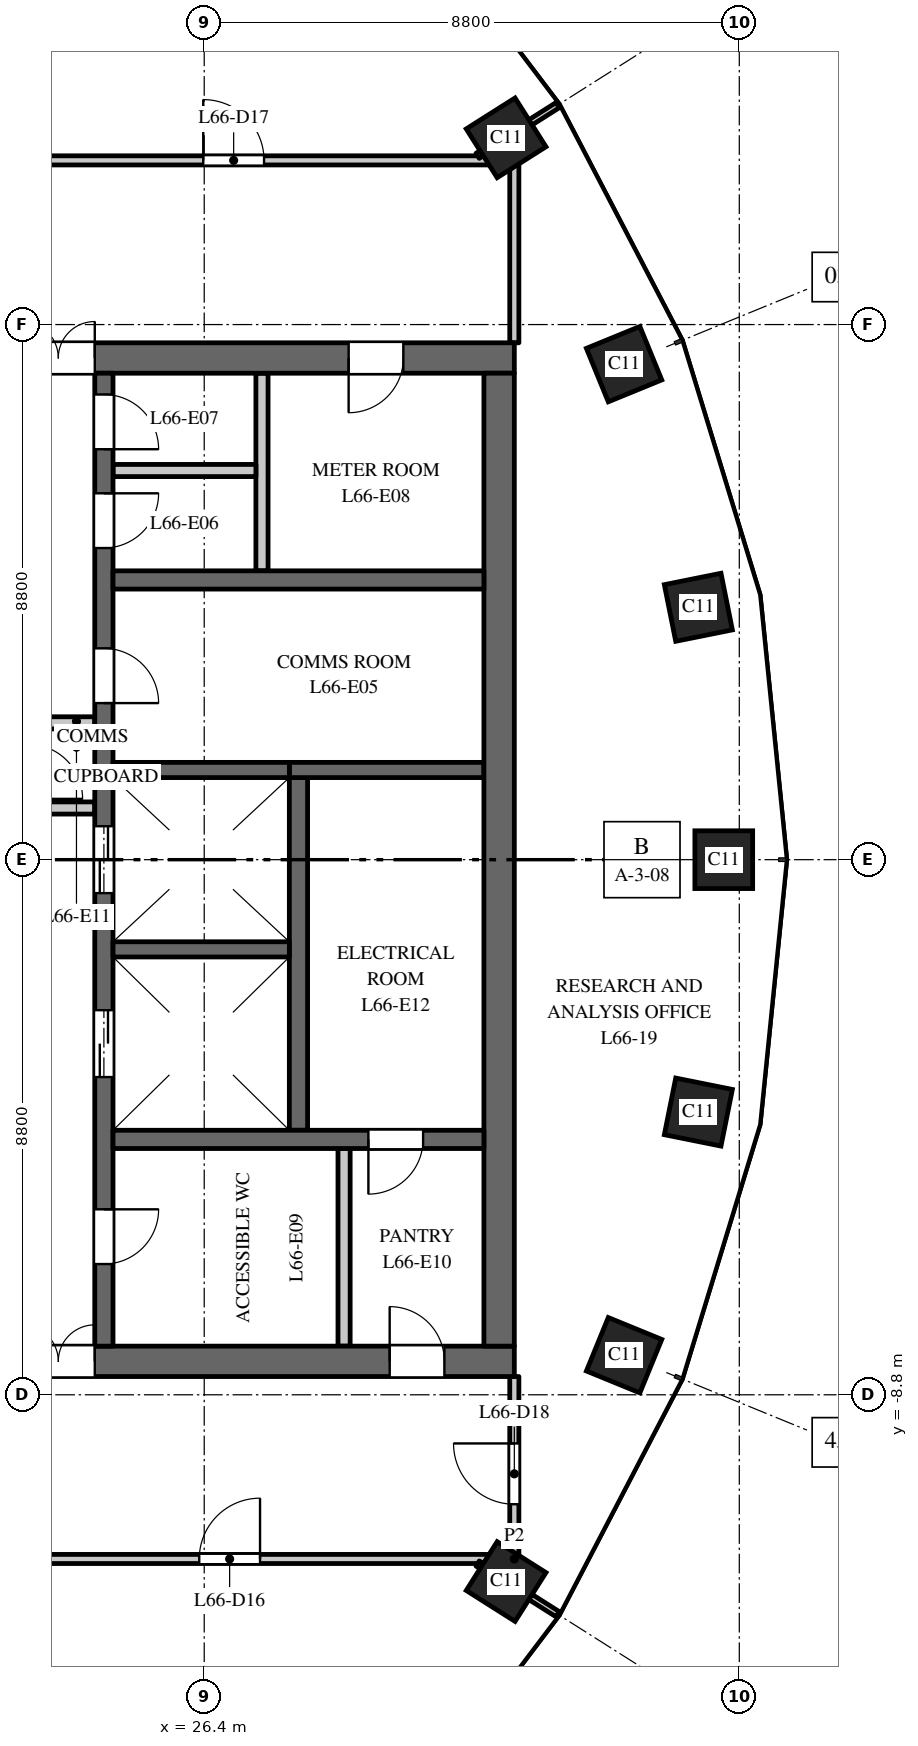
"""IFC4 building model, lengths in metres.
Left out: names, types, materials, properties, quantities, classifications, styles, units other than length and angle.
Written with IfcOpenShell. Run it as: python <this file> out.ifc"""

import sys

from ifc_helpers import new_model, si_unit, direction, frame, frame_2d, origin, origin_2d, place, context, subcontext, project, spatial, rectangle, extrude, element, fill, save


model = new_model("IFC4")
c1 = context("Model", 3, precision=1e-05, world=origin(), true_north=direction((0.0, 1.0)))
c2 = subcontext(c1, "Body", "Model", "MODEL_VIEW")
j1 = project(units=[si_unit("LENGTHUNIT", "METRE"), si_unit("PLANEANGLEUNIT", "RADIAN")], contexts=[c1])
p1 = place(None, origin())
s1 = spatial("IfcSite", under=j1, at=p1, CompositionType="ELEMENT")
p2 = place(p1, origin())
s2 = spatial("IfcBuilding", under=s1, at=p2, CompositionType="ELEMENT")
p3 = place(p2, frame((0.0, 0.0, 307.0)))
s3 = spatial("IfcBuildingStorey", under=s2, at=p3, CompositionType="ELEMENT", Elevation=307.0)
for number, where, z_axis, x_axis in (
    (1, (34.945, 0.0, 0.0), (0.0, 0.0, 1.0), (0.0, 1.0, 0.0)),
    (2, (34.527, 4.151, 0.0), (0.0, 0.0, 1.0), (-0.197, 0.98, 0.0)),
    (3, (33.305, 8.149, 0.0), (0.0, 0.0, 1.0), (-0.379, 0.925, 0.0)),
    (4, (31.365, 11.871, 0.0), (0.0, 0.0, 1.0), (-0.535, 0.845, 0.0)),
    (5, (31.365, -11.871, 0.0), (0.0, 0.0, 1.0), (0.535, 0.845, 0.0)),
    (6, (33.305, -8.149, 0.0), (0.0, 0.0, 1.0), (0.379, 0.925, 0.0)),
    (7, (34.527, -4.151, 0.0), (0.0, 0.0, 1.0), (0.197, 0.98, 0.0)),
):
    element("IfcColumn", number, at=place(p3, frame(where, z_axis=z_axis, x_axis=x_axis)), inside=s3, PredefinedType="COLUMN", context=c2, shape_type="SweptSolid", body=[
        extrude(rectangle(XDim=0.95, YDim=0.95, at=origin_2d()), origin(), (0.0, 0.0, 1.0), 4.0),
    ])
p4 = place(p3, frame((16.5, 8.25, 0.0), z_axis=(0.0, 0.0, 1.0), x_axis=(1.0, 0.0, 0.0)))
e8 = element("IfcWall", 8, at=p4, inside=s3, PredefinedType="SHEAR", context=c2, shape_type="SweptSolid", body=[
    extrude(rectangle(XDim=15.0, YDim=0.5, at=frame_2d((7.5, 0.0))), origin(), (0.0, 0.0, 1.0), 3.7),
])
p5 = place(p4, frame((6.9, 0.0, 0.0)))
e9 = element("IfcOpeningElement", 9, at=p5, cuts=e8, PredefinedType="OPENING", context=c2, shape_type="SweptSolid", body=[
    extrude(rectangle(XDim=1.2, YDim=2.1, at=frame_2d((0.6, 1.05))), frame((0.0, 0.26, 0.0), z_axis=(0.0, -1.0, 0.0), x_axis=(1.0, 0.0, 0.0)), (0.0, 0.0, 1.0), 0.52),
])
p6 = place(p4, frame((12.275, 0.0, 0.0)))
e10 = element("IfcOpeningElement", 10, at=p6, cuts=e8, PredefinedType="OPENING", context=c2, shape_type="SweptSolid", body=[
    extrude(rectangle(XDim=0.9, YDim=2.1, at=frame_2d((0.45, 1.05))), frame((0.0, 0.26, 0.0), z_axis=(0.0, -1.0, 0.0), x_axis=(1.0, 0.0, 0.0)), (0.0, 0.0, 1.0), 0.52),
])
p7 = place(p3, frame((16.5, -8.25, 0.0), z_axis=(0.0, 0.0, 1.0), x_axis=(1.0, 0.0, 0.0)))
e11 = element("IfcWall", 11, at=p7, inside=s3, PredefinedType="SHEAR", context=c2, shape_type="SweptSolid", body=[
    extrude(rectangle(XDim=15.0, YDim=0.5, at=frame_2d((7.5, 0.0))), origin(), (0.0, 0.0, 1.0), 3.7),
])
p8 = place(p7, frame((6.9, 0.0, 0.0)))
e12 = element("IfcOpeningElement", 12, at=p8, cuts=e11, PredefinedType="OPENING", context=c2, shape_type="SweptSolid", body=[
    extrude(rectangle(XDim=1.2, YDim=2.1, at=frame_2d((0.6, 1.05))), frame((0.0, 0.26, 0.0), z_axis=(0.0, -1.0, 0.0), x_axis=(1.0, 0.0, 0.0)), (0.0, 0.0, 1.0), 0.52),
])
p9 = place(p7, frame((12.95, 0.0, 0.0)))
e13 = element("IfcOpeningElement", 13, at=p9, cuts=e11, PredefinedType="OPENING", context=c2, shape_type="SweptSolid", body=[
    extrude(rectangle(XDim=0.9, YDim=2.1, at=frame_2d((0.45, 1.05))), frame((0.0, 0.26, 0.0), z_axis=(0.0, -1.0, 0.0), x_axis=(1.0, 0.0, 0.0)), (0.0, 0.0, 1.0), 0.52),
])
p10 = place(p3, frame((27.95, -4.45, 0.0), z_axis=(0.0, 0.0, 1.0), x_axis=(0.0, 1.0, 0.0)))
e14 = element("IfcWall", 14, at=p10, inside=s3, PredefinedType="SHEAR", context=c2, shape_type="SweptSolid", body=[
    extrude(rectangle(XDim=5.8, YDim=0.3, at=frame_2d((2.9, 0.0))), origin(), (0.0, 0.0, 1.0), 3.7),
])
p11 = place(p3, frame((27.8, 1.475, 0.0), z_axis=(0.0, 0.0, 1.0), x_axis=(1.0, 0.0, 0.0)))
e15 = element("IfcWall", 15, at=p11, inside=s3, PredefinedType="SHEAR", context=c2, shape_type="SweptSolid", body=[
    extrude(rectangle(XDim=3.2, YDim=0.25, at=frame_2d((1.6, 0.0))), origin(), (0.0, 0.0, 1.0), 3.7),
])
p12 = place(p3, frame((24.75, -8.0, 0.0), z_axis=(0.0, 0.0, 1.0), x_axis=(0.0, 1.0, 0.0)))
e16 = element("IfcWall", 16, at=p12, inside=s3, PredefinedType="SHEAR", context=c2, shape_type="SweptSolid", body=[
    extrude(rectangle(XDim=16.0, YDim=0.3, at=frame_2d((8.0, 0.0))), origin(), (0.0, 0.0, 1.0), 3.7),
])
p13 = place(p12, frame((4.425, 0.0, 0.0)))
e17 = element("IfcOpeningElement", 17, at=p13, cuts=e16, PredefinedType="OPENING", context=c2, shape_type="SweptSolid", body=[
    extrude(rectangle(XDim=1.1, YDim=2.1, at=frame_2d((0.55, 1.05))), frame((0.0, 0.16, 0.0), z_axis=(0.0, -1.0, 0.0), x_axis=(1.0, 0.0, 0.0)), (0.0, 0.0, 1.0), 0.32),
])
p14 = place(p12, frame((7.45, 0.0, 0.0)))
e18 = element("IfcOpeningElement", 18, at=p14, cuts=e16, PredefinedType="OPENING", context=c2, shape_type="SweptSolid", body=[
    extrude(rectangle(XDim=1.1, YDim=2.1, at=frame_2d((0.55, 1.05))), frame((0.0, 0.16, 0.0), z_axis=(0.0, -1.0, 0.0), x_axis=(1.0, 0.0, 0.0)), (0.0, 0.0, 1.0), 0.32),
])
p15 = place(p12, frame((10.575, 0.0, 0.0)))
e19 = element("IfcOpeningElement", 19, at=p15, cuts=e16, PredefinedType="OPENING", context=c2, shape_type="SweptSolid", body=[
    extrude(rectangle(XDim=0.9, YDim=2.1, at=frame_2d((0.45, 1.05))), frame((0.0, 0.16, 0.0), z_axis=(0.0, -1.0, 0.0), x_axis=(1.0, 0.0, 0.0)), (0.0, 0.0, 1.0), 0.32),
])
p16 = place(p12, frame((13.125, 0.0, 0.0)))
e20 = element("IfcOpeningElement", 20, at=p16, cuts=e16, PredefinedType="OPENING", context=c2, shape_type="SweptSolid", body=[
    extrude(rectangle(XDim=0.9, YDim=2.1, at=frame_2d((0.45, 1.05))), frame((0.0, 0.16, 0.0), z_axis=(0.0, -1.0, 0.0), x_axis=(1.0, 0.0, 0.0)), (0.0, 0.0, 1.0), 0.32),
])
p17 = place(p12, frame((14.75, 0.0, 0.0)))
e21 = element("IfcOpeningElement", 21, at=p17, cuts=e16, PredefinedType="OPENING", context=c2, shape_type="SweptSolid", body=[
    extrude(rectangle(XDim=0.9, YDim=2.1, at=frame_2d((0.45, 1.05))), frame((0.0, 0.16, 0.0), z_axis=(0.0, -1.0, 0.0), x_axis=(1.0, 0.0, 0.0)), (0.0, 0.0, 1.0), 0.32),
])
p18 = place(p12, frame((1.35, 0.0, 0.0)))
e22 = element("IfcOpeningElement", 22, at=p18, cuts=e16, PredefinedType="OPENING", context=c2, shape_type="SweptSolid", body=[
    extrude(rectangle(XDim=0.9, YDim=2.1, at=frame_2d((0.45, 1.05))), frame((0.0, 0.16, 0.0), z_axis=(0.0, -1.0, 0.0), x_axis=(1.0, 0.0, 0.0)), (0.0, 0.0, 1.0), 0.32),
])
for number, where, z_axis, x_axis in (
    (23, (23.4, 0.85, 0.0), (0.0, 0.0, 1.0), (1.0, 0.0, 0.0)),
    (24, (23.4, 2.25, 0.0), (0.0, 0.0, 1.0), (1.0, 0.0, 0.0)),
):
    element("IfcWall", number, at=place(p3, frame(where, z_axis=z_axis, x_axis=x_axis)), inside=s3, PredefinedType="PARTITIONING", context=c2, shape_type="SweptSolid", body=[
        extrude(rectangle(XDim=1.2, YDim=0.2, at=frame_2d((0.6, 0.0))), origin(), (0.0, 0.0, 1.0), 3.7),
    ])
p19 = place(p3, frame((31.25, -8.0, 0.0), z_axis=(0.0, 0.0, 1.0), x_axis=(0.0, 1.0, 0.0)))
e25 = element("IfcWall", 25, at=p19, inside=s3, PredefinedType="SHEAR", context=c2, shape_type="SweptSolid", body=[
    extrude(rectangle(XDim=16.0, YDim=0.5, at=frame_2d((8.0, 0.0))), origin(), (0.0, 0.0, 1.0), 3.7),
])
p20 = place(p3, frame((24.9, 4.6, 0.0), z_axis=(0.0, 0.0, 1.0), x_axis=(1.0, 0.0, 0.0)))
e26 = element("IfcWall", 26, at=p20, inside=s3, PredefinedType="SHEAR", context=c2, shape_type="SweptSolid", body=[
    extrude(rectangle(XDim=6.1, YDim=0.3, at=frame_2d((3.05, 0.0))), origin(), (0.0, 0.0, 1.0), 3.7),
])
for number, where, z_axis, x_axis in (
    (27, (27.35, 4.75, 0.0), (0.0, 0.0, 1.0), (0.0, 1.0, 0.0)),
    (28, (28.7, -8.0, 0.0), (0.0, 0.0, 1.0), (0.0, 1.0, 0.0)),
):
    element("IfcWall", number, at=place(p3, frame(where, z_axis=z_axis, x_axis=x_axis)), inside=s3, PredefinedType="PARTITIONING", context=c2, shape_type="SweptSolid", body=[
        extrude(rectangle(XDim=3.25, YDim=0.2, at=frame_2d((1.625, 0.0))), origin(), (0.0, 0.0, 1.0), 3.7),
    ])
p21 = place(p3, frame((24.9, 6.4, 0.0), z_axis=(0.0, 0.0, 1.0), x_axis=(1.0, 0.0, 0.0)))
e29 = element("IfcWall", 29, at=p21, inside=s3, PredefinedType="PARTITIONING", context=c2, shape_type="SweptSolid", body=[
    extrude(rectangle(XDim=2.35, YDim=0.2, at=frame_2d((1.175, 0.0))), origin(), (0.0, 0.0, 1.0), 3.7),
])
p22 = place(p3, frame((24.9, -4.6, 0.0), z_axis=(0.0, 0.0, 1.0), x_axis=(1.0, 0.0, 0.0)))
e30 = element("IfcWall", 30, at=p22, inside=s3, PredefinedType="SHEAR", context=c2, shape_type="SweptSolid", body=[
    extrude(rectangle(XDim=6.1, YDim=0.3, at=frame_2d((3.05, 0.0))), origin(), (0.0, 0.0, 1.0), 3.7),
])
p23 = place(p22, frame((4.2, 0.0, 0.0)))
e31 = element("IfcOpeningElement", 31, at=p23, cuts=e30, PredefinedType="OPENING", context=c2, shape_type="SweptSolid", body=[
    extrude(rectangle(XDim=0.9, YDim=2.1, at=frame_2d((0.45, 1.05))), frame((0.0, 0.16, 0.0), z_axis=(0.0, -1.0, 0.0), x_axis=(1.0, 0.0, 0.0)), (0.0, 0.0, 1.0), 0.32),
])
for number, where, z_axis, x_axis in (
    (32, (24.9, -1.475, 0.0), (0.0, 0.0, 1.0), (1.0, 0.0, 0.0)),
    (33, (24.9, 1.475, 0.0), (0.0, 0.0, 1.0), (1.0, 0.0, 0.0)),
):
    element("IfcWall", number, at=place(p3, frame(where, z_axis=z_axis, x_axis=x_axis)), inside=s3, PredefinedType="SHEAR", context=c2, shape_type="SweptSolid", body=[
        extrude(rectangle(XDim=2.9, YDim=0.25, at=frame_2d((1.45, 0.0))), origin(), (0.0, 0.0, 1.0), 3.7),
    ])
p24 = place(p3, frame((0.315, -11.5, 0.0), z_axis=(0.0, 0.0, 1.0), x_axis=(1.0, 0.0, 0.0)))
e34 = element("IfcWall", 34, at=p24, inside=s3, PredefinedType="PARTITIONING", context=c2, shape_type="SweptSolid", body=[
    extrude(rectangle(XDim=31.185, YDim=0.15, at=frame_2d((15.593, 0.0))), origin(), (0.0, 0.0, 1.0), 2.75),
])
p25 = place(p24, frame((10.9, 0.0, 0.0)))
e35 = element("IfcOpeningElement", 35, at=p25, cuts=e34, PredefinedType="OPENING", context=c2, shape_type="SweptSolid", body=[
    extrude(rectangle(XDim=1.0, YDim=2.1, at=frame_2d((0.5, 1.05))), frame((0.0, 0.085, 0.0), z_axis=(0.0, -1.0, 0.0), x_axis=(1.0, 0.0, 0.0)), (0.0, 0.0, 1.0), 0.17),
])
p26 = place(p24, frame((26.003, 0.0, 0.0)))
e36 = element("IfcOpeningElement", 36, at=p26, cuts=e34, PredefinedType="OPENING", context=c2, shape_type="SweptSolid", body=[
    extrude(rectangle(XDim=1.0, YDim=2.1, at=frame_2d((0.5, 1.05))), frame((0.0, 0.085, 0.0), z_axis=(0.0, -1.0, 0.0), x_axis=(1.0, 0.0, 0.0)), (0.0, 0.0, 1.0), 0.17),
])
p27 = place(p3, frame((0.315, 11.5, 0.0), z_axis=(0.0, 0.0, 1.0), x_axis=(1.0, 0.0, 0.0)))
e37 = element("IfcWall", 37, at=p27, inside=s3, PredefinedType="PARTITIONING", context=c2, shape_type="SweptSolid", body=[
    extrude(rectangle(XDim=31.185, YDim=0.15, at=frame_2d((15.593, 0.0))), origin(), (0.0, 0.0, 1.0), 2.75),
])
p28 = place(p27, frame((10.709, 0.0, 0.0)))
e38 = element("IfcOpeningElement", 38, at=p28, cuts=e37, PredefinedType="OPENING", context=c2, shape_type="SweptSolid", body=[
    extrude(rectangle(XDim=1.0, YDim=2.1, at=frame_2d((0.5, 1.05))), frame((0.0, 0.085, 0.0), z_axis=(0.0, -1.0, 0.0), x_axis=(1.0, 0.0, 0.0)), (0.0, 0.0, 1.0), 0.17),
])
p29 = place(p27, frame((26.069, 0.0, 0.0)))
e39 = element("IfcOpeningElement", 39, at=p29, cuts=e37, PredefinedType="OPENING", context=c2, shape_type="SweptSolid", body=[
    extrude(rectangle(XDim=1.0, YDim=2.1, at=frame_2d((0.5, 1.05))), frame((0.0, 0.085, 0.0), z_axis=(0.0, -1.0, 0.0), x_axis=(1.0, 0.0, 0.0)), (0.0, 0.0, 1.0), 0.17),
])
for number, where, z_axis, x_axis in (
    (40, (30.897, -11.575, 0.0), (0.0, 0.0, 1.0), (0.845, -0.535, 0.0)),
    (41, (30.897, 11.575, 0.0), (0.0, 0.0, 1.0), (0.845, 0.535, 0.0)),
):
    element("IfcWall", number, at=place(p3, frame(where, z_axis=z_axis, x_axis=x_axis)), inside=s3, PredefinedType="PARTITIONING", context=c2, shape_type="SweptSolid", body=[
        extrude(rectangle(XDim=1.557, YDim=0.1, at=frame_2d((0.778, 0.0))), origin(), (0.0, 0.0, 1.0), 3.0),
    ])
p30 = place(p3, frame((31.5, -11.5, 0.0), z_axis=(0.0, 0.0, 1.0), x_axis=(0.0, 1.0, 0.0)))
e42 = element("IfcWall", 42, at=p30, inside=s3, PredefinedType="PARTITIONING", context=c2, shape_type="SweptSolid", body=[
    extrude(rectangle(XDim=3.0, YDim=0.15, at=frame_2d((1.5, 0.0))), origin(), (0.0, 0.0, 1.0), 3.0),
])
p31 = place(p30, frame((0.9, 0.0, 0.0)))
e43 = element("IfcOpeningElement", 43, at=p31, cuts=e42, PredefinedType="OPENING", context=c2, shape_type="SweptSolid", body=[
    extrude(rectangle(XDim=1.0, YDim=2.1, at=frame_2d((0.5, 1.05))), frame((0.0, 0.085, 0.0), z_axis=(0.0, -1.0, 0.0), x_axis=(1.0, 0.0, 0.0)), (0.0, 0.0, 1.0), 0.17),
])
p32 = place(p3, frame((31.5, 8.5, 0.0), z_axis=(0.0, 0.0, 1.0), x_axis=(0.0, 1.0, 0.0)))
e44 = element("IfcWall", 44, at=p32, inside=s3, PredefinedType="PARTITIONING", context=c2, shape_type="SweptSolid", body=[
    extrude(rectangle(XDim=3.0, YDim=0.15, at=frame_2d((1.5, 0.0))), origin(), (0.0, 0.0, 1.0), 3.0),
])
p33 = place(p13, origin())
e45 = element("IfcDoor", 45, at=p33, inside=s3, OperationType="DOUBLE_DOOR_SLIDING", PredefinedType="DOOR", context=c2, shape_type="SweptSolid", body=[
    extrude(rectangle(XDim=1.1, YDim=2.1, at=frame_2d((0.55, 1.05))), frame((0.0, 0.025, 0.0), z_axis=(0.0, -1.0, 0.0), x_axis=(1.0, 0.0, 0.0)), (0.0, 0.0, 1.0), 0.05),
])
fill(e17, e45)
p34 = place(p14, origin())
e46 = element("IfcDoor", 46, at=p34, inside=s3, OperationType="DOUBLE_DOOR_SLIDING", PredefinedType="DOOR", context=c2, shape_type="SweptSolid", body=[
    extrude(rectangle(XDim=1.1, YDim=2.1, at=frame_2d((0.55, 1.05))), frame((0.0, 0.025, 0.0), z_axis=(0.0, -1.0, 0.0), x_axis=(1.0, 0.0, 0.0)), (0.0, 0.0, 1.0), 0.05),
])
fill(e18, e46)
p35 = place(p5, origin())
e47 = element("IfcDoor", 47, at=p35, inside=s3, OperationType="DOUBLE_DOOR_DOUBLE_SWING", PredefinedType="DOOR", context=c2, shape_type="SweptSolid", body=[
    extrude(rectangle(XDim=1.2, YDim=2.1, at=frame_2d((0.6, 1.05))), frame((0.0, 0.025, 0.0), z_axis=(0.0, -1.0, 0.0), x_axis=(1.0, 0.0, 0.0)), (0.0, 0.0, 1.0), 0.05),
])
fill(e9, e47)
p36 = place(p8, origin())
e48 = element("IfcDoor", 48, at=p36, inside=s3, OperationType="DOUBLE_DOOR_DOUBLE_SWING", PredefinedType="DOOR", context=c2, shape_type="SweptSolid", body=[
    extrude(rectangle(XDim=1.2, YDim=2.1, at=frame_2d((0.6, 1.05))), frame((0.0, 0.025, 0.0), z_axis=(0.0, -1.0, 0.0), x_axis=(1.0, 0.0, 0.0)), (0.0, 0.0, 1.0), 0.05),
])
fill(e12, e48)
p37 = place(p15, origin())
e49 = element("IfcDoor", 49, at=p37, inside=s3, OperationType="SINGLE_SWING_LEFT", PredefinedType="DOOR", context=c2, shape_type="SweptSolid", body=[
    extrude(rectangle(XDim=0.9, YDim=2.1, at=frame_2d((0.45, 1.05))), frame((0.0, 0.025, 0.0), z_axis=(0.0, -1.0, 0.0), x_axis=(1.0, 0.0, 0.0)), (0.0, 0.0, 1.0), 0.05),
])
fill(e19, e49)
p38 = place(p16, origin())
e50 = element("IfcDoor", 50, at=p38, inside=s3, OperationType="SINGLE_SWING_RIGHT", PredefinedType="DOOR", context=c2, shape_type="SweptSolid", body=[
    extrude(rectangle(XDim=0.9, YDim=2.1, at=frame_2d((0.45, 1.05))), frame((0.0, 0.025, 0.0), z_axis=(0.0, -1.0, 0.0), x_axis=(1.0, 0.0, 0.0)), (0.0, 0.0, 1.0), 0.05),
])
fill(e20, e50)
p39 = place(p17, origin())
e51 = element("IfcDoor", 51, at=p39, inside=s3, OperationType="SINGLE_SWING_LEFT", PredefinedType="DOOR", context=c2, shape_type="SweptSolid", body=[
    extrude(rectangle(XDim=0.9, YDim=2.1, at=frame_2d((0.45, 1.05))), frame((0.0, 0.025, 0.0), z_axis=(0.0, -1.0, 0.0), x_axis=(1.0, 0.0, 0.0)), (0.0, 0.0, 1.0), 0.05),
])
fill(e21, e51)
p40 = place(p6, origin())
e52 = element("IfcDoor", 52, at=p40, inside=s3, OperationType="SINGLE_SWING_LEFT", PredefinedType="DOOR", context=c2, shape_type="SweptSolid", body=[
    extrude(rectangle(XDim=0.9, YDim=2.1, at=frame_2d((0.45, 1.05))), frame((0.0, 0.025, 0.0), z_axis=(0.0, -1.0, 0.0), x_axis=(1.0, 0.0, 0.0)), (0.0, 0.0, 1.0), 0.05),
])
fill(e10, e52)
p41 = place(p18, origin())
e53 = element("IfcDoor", 53, at=p41, inside=s3, OperationType="SINGLE_SWING_RIGHT", PredefinedType="DOOR", context=c2, shape_type="SweptSolid", body=[
    extrude(rectangle(XDim=0.9, YDim=2.1, at=frame_2d((0.45, 1.05))), frame((0.0, 0.025, 0.0), z_axis=(0.0, -1.0, 0.0), x_axis=(1.0, 0.0, 0.0)), (0.0, 0.0, 1.0), 0.05),
])
fill(e22, e53)
p42 = place(p9, origin())
e54 = element("IfcDoor", 54, at=p42, inside=s3, OperationType="SINGLE_SWING_RIGHT", PredefinedType="DOOR", context=c2, shape_type="SweptSolid", body=[
    extrude(rectangle(XDim=0.9, YDim=2.1, at=frame_2d((0.45, 1.05))), frame((0.0, 0.025, 0.0), z_axis=(0.0, -1.0, 0.0), x_axis=(1.0, 0.0, 0.0)), (0.0, 0.0, 1.0), 0.05),
])
fill(e13, e54)
p43 = place(p23, origin())
e55 = element("IfcDoor", 55, at=p43, inside=s3, OperationType="SINGLE_SWING_LEFT", PredefinedType="DOOR", context=c2, shape_type="SweptSolid", body=[
    extrude(rectangle(XDim=0.9, YDim=2.1, at=frame_2d((0.45, 1.05))), frame((0.0, 0.025, 0.0), z_axis=(0.0, -1.0, 0.0), x_axis=(1.0, 0.0, 0.0)), (0.0, 0.0, 1.0), 0.05),
])
fill(e31, e55)
p44 = place(p26, origin())
e56 = element("IfcDoor", 56, at=p44, inside=s3, OperationType="SINGLE_SWING_RIGHT", PredefinedType="DOOR", context=c2, shape_type="SweptSolid", body=[
    extrude(rectangle(XDim=1.0, YDim=2.1, at=frame_2d((0.5, 1.05))), frame((0.0, 0.025, 0.0), z_axis=(0.0, -1.0, 0.0), x_axis=(1.0, 0.0, 0.0)), (0.0, 0.0, 1.0), 0.05),
])
fill(e36, e56)
p45 = place(p29, origin())
e57 = element("IfcDoor", 57, at=p45, inside=s3, OperationType="SINGLE_SWING_LEFT", PredefinedType="DOOR", context=c2, shape_type="SweptSolid", body=[
    extrude(rectangle(XDim=1.0, YDim=2.1, at=frame_2d((0.5, 1.05))), frame((0.0, 0.025, 0.0), z_axis=(0.0, -1.0, 0.0), x_axis=(1.0, 0.0, 0.0)), (0.0, 0.0, 1.0), 0.05),
])
fill(e39, e57)
p46 = place(p31, origin())
e58 = element("IfcDoor", 58, at=p46, inside=s3, OperationType="SINGLE_SWING_RIGHT", PredefinedType="DOOR", context=c2, shape_type="SweptSolid", body=[
    extrude(rectangle(XDim=1.0, YDim=2.1, at=frame_2d((0.5, 1.05))), frame((0.0, 0.025, 0.0), z_axis=(0.0, -1.0, 0.0), x_axis=(1.0, 0.0, 0.0)), (0.0, 0.0, 1.0), 0.05),
])
fill(e43, e58)
save(model, sys.argv[1])
